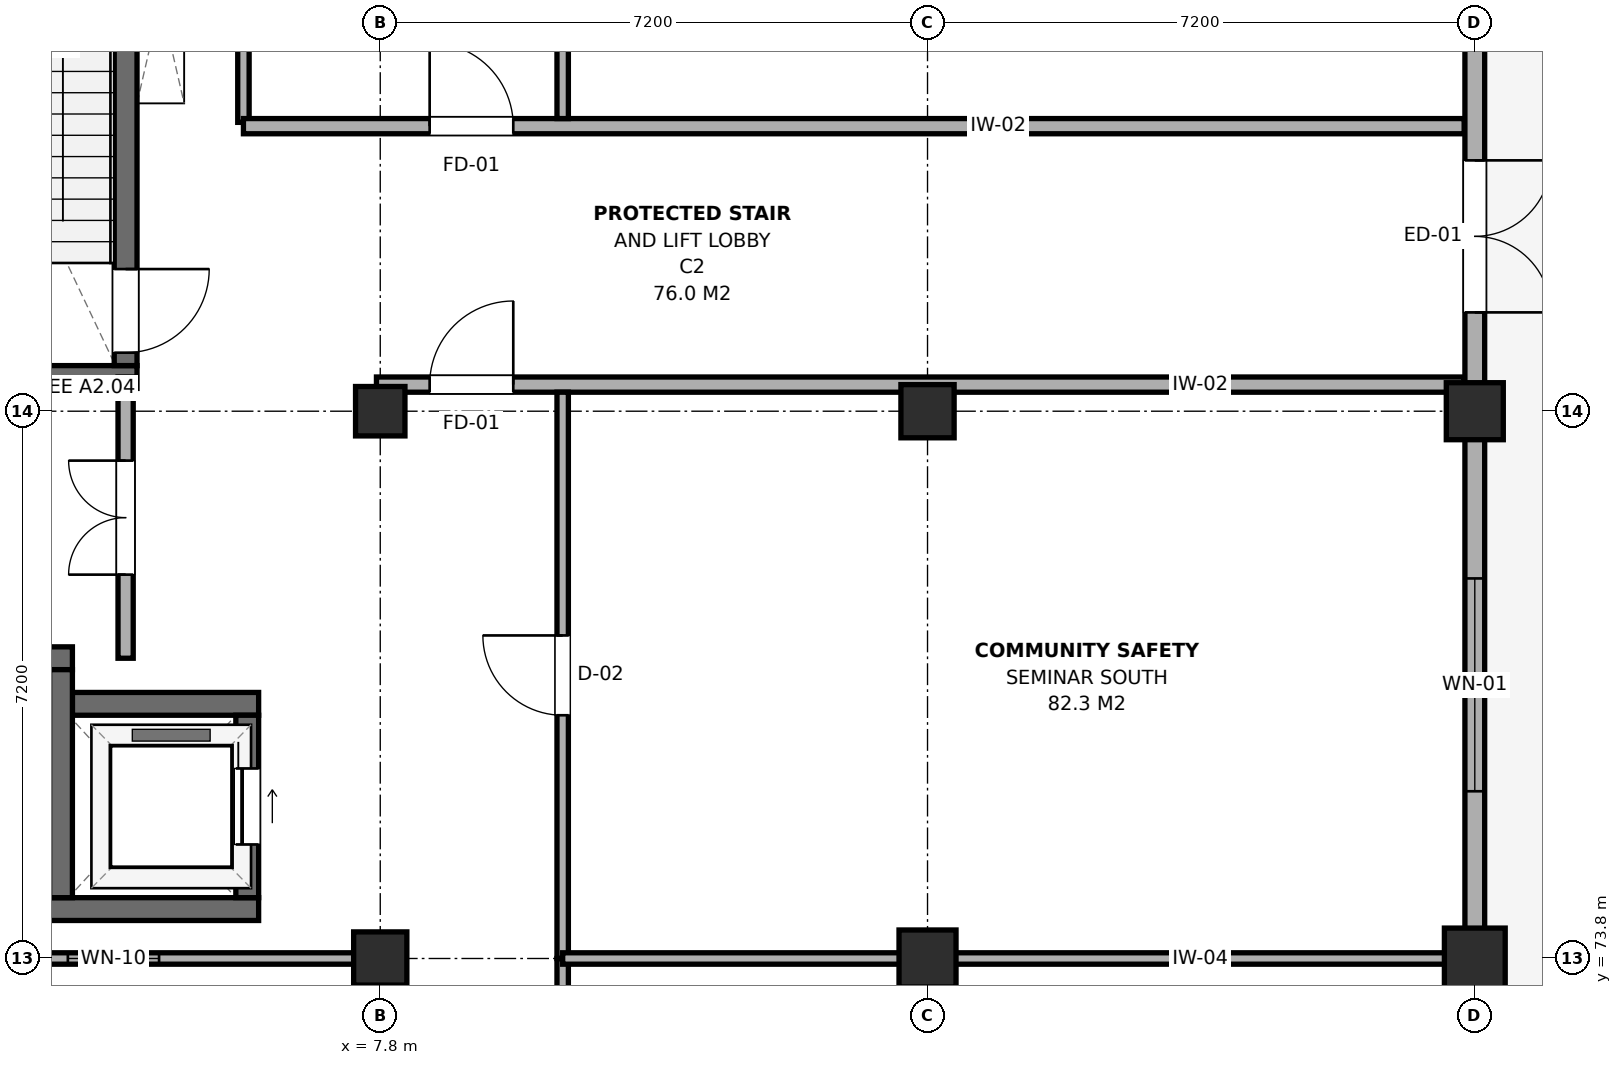
"""IFC4 building model, lengths in metres.
Left out: names, types, materials, properties, quantities, classifications, styles, units other than length and angle.
Written with IfcOpenShell. Run it as: python <this file> out.ifc"""

import sys

from ifc_helpers import new_model, si_unit, direction, frame, frame_2d, origin, origin_2d, place, context, subcontext, project, spatial, rectangle, extrude, element, fill, save


model = new_model("IFC4")
c1 = context("Model", 3, precision=1e-05, world=origin(), true_north=direction((0.0, 1.0)))
c2 = subcontext(c1, "Body", "Model", "MODEL_VIEW")
j1 = project(units=[si_unit("LENGTHUNIT", "METRE"), si_unit("PLANEANGLEUNIT", "RADIAN")], contexts=[c1])
p1 = place(None, origin())
s1 = spatial("IfcSite", under=j1, at=p1, CompositionType="ELEMENT")
p2 = place(p1, origin())
s2 = spatial("IfcBuilding", under=s1, at=p2, CompositionType="ELEMENT")
p3 = place(p2, origin())
s3 = spatial("IfcBuildingStorey", under=s2, at=p3, CompositionType="ELEMENT", Elevation=0.0)
p4 = place(p3, frame((7.8, 73.8, 0.0), z_axis=(0.0, 0.0, 1.0), x_axis=(1.0, 0.0, 0.0)))
e1 = element("IfcColumn", 1, at=p4, inside=s3, PredefinedType="COLUMN", context=c2, shape_type="SweptSolid", body=[
    extrude(rectangle(XDim=0.7, YDim=0.7, at=origin_2d()), origin(), (0.0, 0.0, 1.0), 4.8),
])
p5 = place(p3, frame((7.8, 81.0, 0.0), z_axis=(0.0, 0.0, 1.0), x_axis=(1.0, 0.0, 0.0)))
e2 = element("IfcColumn", 2, at=p5, inside=s3, PredefinedType="COLUMN", context=c2, shape_type="SweptSolid", body=[
    extrude(rectangle(XDim=0.65, YDim=0.65, at=origin_2d()), origin(), (0.0, 0.0, 1.0), 4.8),
])
p6 = place(p3, frame((15.0, 73.8, 0.0), z_axis=(0.0, 0.0, 1.0), x_axis=(1.0, 0.0, 0.0)))
e3 = element("IfcColumn", 3, at=p6, inside=s3, PredefinedType="COLUMN", context=c2, shape_type="SweptSolid", body=[
    extrude(rectangle(XDim=0.75, YDim=0.75, at=origin_2d()), origin(), (0.0, 0.0, 1.0), 4.8),
])
p7 = place(p3, frame((15.0, 81.0, 0.0), z_axis=(0.0, 0.0, 1.0), x_axis=(1.0, 0.0, 0.0)))
e4 = element("IfcColumn", 4, at=p7, inside=s3, PredefinedType="COLUMN", context=c2, shape_type="SweptSolid", body=[
    extrude(rectangle(XDim=0.7, YDim=0.7, at=origin_2d()), origin(), (0.0, 0.0, 1.0), 4.8),
])
p8 = place(p3, frame((22.2, 73.8, 0.0), z_axis=(0.0, 0.0, 1.0), x_axis=(1.0, 0.0, 0.0)))
e5 = element("IfcColumn", 5, at=p8, inside=s3, PredefinedType="COLUMN", context=c2, shape_type="SweptSolid", body=[
    extrude(rectangle(XDim=0.8, YDim=0.8, at=origin_2d()), origin(), (0.0, 0.0, 1.0), 4.8),
])
p9 = place(p3, frame((22.2, 81.0, 0.0), z_axis=(0.0, 0.0, 1.0), x_axis=(1.0, 0.0, 0.0)))
e6 = element("IfcColumn", 6, at=p9, inside=s3, PredefinedType="COLUMN", context=c2, shape_type="SweptSolid", body=[
    extrude(rectangle(XDim=0.75, YDim=0.75, at=origin_2d()), origin(), (0.0, 0.0, 1.0), 4.8),
])
p10 = place(p3, frame((0.75, 81.45, 0.0), z_axis=(0.0, 0.0, 1.0), x_axis=(1.0, 0.0, 0.0)))
e7 = element("IfcWall", 7, at=p10, inside=s3, PredefinedType="SHEAR", context=c2, shape_type="SweptSolid", body=[
    extrude(rectangle(XDim=3.85, YDim=0.3, at=frame_2d((1.925, 0.0))), origin(), (0.0, 0.0, 1.0), 4.56),
])
p11 = place(p3, frame((4.45, 81.6, 0.0), z_axis=(0.0, 0.0, 1.0), x_axis=(0.0, 1.0, 0.0)))
e8 = element("IfcWall", 8, at=p11, inside=s3, PredefinedType="SHEAR", context=c2, shape_type="SweptSolid", body=[
    extrude(rectangle(XDim=6.4, YDim=0.3, at=frame_2d((3.2, 0.0))), origin(), (0.0, 0.0, 1.0), 4.56),
])
p12 = place(p11, frame((0.17, 0.0, 0.0)))
e9 = element("IfcOpeningElement", 9, at=p12, cuts=e8, PredefinedType="OPENING", context=c2, shape_type="SweptSolid", body=[
    extrude(rectangle(XDim=1.1, YDim=2.15, at=frame_2d((0.55, 1.075))), frame((0.0, 0.165, 0.0), z_axis=(0.0, -1.0, 0.0), x_axis=(1.0, 0.0, 0.0)), (0.0, 0.0, 1.0), 0.33),
])
p13 = place(p3, frame((0.75, 74.45, 0.0), z_axis=(0.0, 0.0, 1.0), x_axis=(1.0, 0.0, 0.0)))
e10 = element("IfcWall", 10, at=p13, inside=s3, PredefinedType="SHEAR", context=c2, shape_type="SweptSolid", body=[
    extrude(rectangle(XDim=5.45, YDim=0.3, at=frame_2d((2.725, 0.0))), origin(), (0.0, 0.0, 1.0), 4.56),
])
p14 = place(p3, frame((0.75, 77.75, 0.0), z_axis=(0.0, 0.0, 1.0), x_axis=(1.0, 0.0, 0.0)))
e11 = element("IfcWall", 11, at=p14, inside=s3, PredefinedType="SHEAR", context=c2, shape_type="SweptSolid", body=[
    extrude(rectangle(XDim=3.0, YDim=0.3, at=frame_2d((1.5, 0.0))), origin(), (0.0, 0.0, 1.0), 4.56),
])
p15 = place(p14, frame((1.1, 0.0, 0.0)))
e12 = element("IfcOpeningElement", 12, at=p15, cuts=e11, PredefinedType="OPENING", context=c2, shape_type="SweptSolid", body=[
    extrude(rectangle(XDim=1.1, YDim=2.15, at=frame_2d((0.55, 1.075))), frame((0.0, 0.165, 0.0), z_axis=(0.0, -1.0, 0.0), x_axis=(1.0, 0.0, 0.0)), (0.0, 0.0, 1.0), 0.33),
])
p16 = place(p3, frame((3.75, 77.15, 0.0), z_axis=(0.0, 0.0, 1.0), x_axis=(1.0, 0.0, 0.0)))
e13 = element("IfcWall", 13, at=p16, inside=s3, PredefinedType="SHEAR", context=c2, shape_type="SweptSolid", body=[
    extrude(rectangle(XDim=2.45, YDim=0.3, at=frame_2d((1.225, 0.0))), origin(), (0.0, 0.0, 1.0), 4.56),
])
p17 = place(p3, frame((3.6, 74.6, 0.0), z_axis=(0.0, 0.0, 1.0), x_axis=(0.0, 1.0, 0.0)))
e14 = element("IfcWall", 14, at=p17, inside=s3, PredefinedType="SHEAR", context=c2, shape_type="SweptSolid", body=[
    extrude(rectangle(XDim=3.0, YDim=0.3, at=frame_2d((1.5, 0.0))), origin(), (0.0, 0.0, 1.0), 4.56),
])
p18 = place(p3, frame((6.05, 74.6, 0.0), z_axis=(0.0, 0.0, 1.0), x_axis=(0.0, 1.0, 0.0)))
e15 = element("IfcWall", 15, at=p18, inside=s3, PredefinedType="SHEAR", context=c2, shape_type="SweptSolid", body=[
    extrude(rectangle(XDim=2.4, YDim=0.3, at=frame_2d((1.2, 0.0))), origin(), (0.0, 0.0, 1.0), 4.56),
])
p19 = place(p18, frame((0.7, 0.0, 0.0)))
e16 = element("IfcOpeningElement", 16, at=p19, cuts=e15, PredefinedType="OPENING", context=c2, shape_type="SweptSolid", body=[
    extrude(rectangle(XDim=1.0, YDim=2.15, at=frame_2d((0.5, 1.075))), frame((0.0, 0.165, 0.0), z_axis=(0.0, -1.0, 0.0), x_axis=(1.0, 0.0, 0.0)), (0.0, 0.0, 1.0), 0.33),
])
p20 = place(p3, frame((22.2, 66.6, 0.0), z_axis=(0.0, 0.0, 1.0), x_axis=(0.0, 1.0, 0.0)))
e17 = element("IfcWall", 17, at=p20, inside=s3, PredefinedType="SOLIDWALL", context=c2, shape_type="SweptSolid", body=[
    extrude(rectangle(XDim=7.2, YDim=0.26, at=frame_2d((3.6, 0.0))), origin(), (0.0, 0.0, 1.0), 4.055),
])
p21 = place(p20, frame((2.2, 0.0, 0.9)))
e18 = element("IfcOpeningElement", 18, at=p21, cuts=e17, PredefinedType="OPENING", context=c2, shape_type="SweptSolid", body=[
    extrude(rectangle(XDim=2.8, YDim=2.2, at=frame_2d((1.4, 1.1))), frame((0.0, 0.145, 0.0), z_axis=(0.0, -1.0, 0.0), x_axis=(1.0, 0.0, 0.0)), (0.0, 0.0, 1.0), 0.29),
])
p22 = place(p3, frame((22.2, 73.8, 0.0), z_axis=(0.0, 0.0, 1.0), x_axis=(0.0, 1.0, 0.0)))
e19 = element("IfcWall", 19, at=p22, inside=s3, PredefinedType="SOLIDWALL", context=c2, shape_type="SweptSolid", body=[
    extrude(rectangle(XDim=7.2, YDim=0.26, at=frame_2d((3.6, 0.0))), origin(), (0.0, 0.0, 1.0), 4.105),
])
p23 = place(p22, frame((2.2, 0.0, 0.9)))
e20 = element("IfcOpeningElement", 20, at=p23, cuts=e19, PredefinedType="OPENING", context=c2, shape_type="SweptSolid", body=[
    extrude(rectangle(XDim=2.8, YDim=2.2, at=frame_2d((1.4, 1.1))), frame((0.0, 0.145, 0.0), z_axis=(0.0, -1.0, 0.0), x_axis=(1.0, 0.0, 0.0)), (0.0, 0.0, 1.0), 0.29),
])
p24 = place(p3, frame((22.2, 81.0, 0.0), z_axis=(0.0, 0.0, 1.0), x_axis=(0.0, 1.0, 0.0)))
e21 = element("IfcWall", 21, at=p24, inside=s3, PredefinedType="SOLIDWALL", context=c2, shape_type="SweptSolid", body=[
    extrude(rectangle(XDim=7.2, YDim=0.26, at=frame_2d((3.6, 0.0))), origin(), (0.0, 0.0, 1.0), 4.205),
])
p25 = place(p24, frame((1.3, 0.0, 0.0)))
e22 = element("IfcOpeningElement", 22, at=p25, cuts=e21, PredefinedType="OPENING", context=c2, shape_type="SweptSolid", body=[
    extrude(rectangle(XDim=2.0, YDim=2.25, at=frame_2d((1.0, 1.125))), frame((0.0, 0.145, 0.0), z_axis=(0.0, -1.0, 0.0), x_axis=(1.0, 0.0, 0.0)), (0.0, 0.0, 1.0), 0.29),
])
p26 = place(p3, frame((4.45, 77.75, 0.0), z_axis=(0.0, 0.0, 1.0), x_axis=(0.0, 1.0, 0.0)))
e23 = element("IfcWall", 23, at=p26, inside=s3, PredefinedType="PARTITIONING", context=c2, shape_type="SweptSolid", body=[
    extrude(rectangle(XDim=3.7, YDim=0.2, at=frame_2d((1.85, 0.0))), origin(), (0.0, 0.0, 1.0), 3.955),
])
p27 = place(p26, frame((1.1, 0.0, 0.0)))
e24 = element("IfcOpeningElement", 24, at=p27, cuts=e23, PredefinedType="OPENING", context=c2, shape_type="SweptSolid", body=[
    extrude(rectangle(XDim=1.5, YDim=2.15, at=frame_2d((0.75, 1.075))), frame((0.0, 0.115, 0.0), z_axis=(0.0, -1.0, 0.0), x_axis=(1.0, 0.0, 0.0)), (0.0, 0.0, 1.0), 0.23),
])
p28 = place(p3, frame((6.0, 84.8, 0.0), z_axis=(0.0, 0.0, 1.0), x_axis=(0.0, 1.0, 0.0)))
e25 = element("IfcWall", 25, at=p28, inside=s3, PredefinedType="PARTITIONING", context=c2, shape_type="SweptSolid", body=[
    extrude(rectangle(XDim=3.2, YDim=0.15, at=frame_2d((1.6, 0.0))), origin(), (0.0, 0.0, 1.0), 4.105),
])
p29 = place(p28, frame((1.175, 0.0, 0.0)))
e26 = element("IfcOpeningElement", 26, at=p29, cuts=e25, PredefinedType="OPENING", context=c2, shape_type="SweptSolid", body=[
    extrude(rectangle(XDim=0.85, YDim=2.1, at=frame_2d((0.425, 1.05))), frame((0.0, 0.09, 0.0), z_axis=(0.0, -1.0, 0.0), x_axis=(1.0, 0.0, 0.0)), (0.0, 0.0, 1.0), 0.18),
])
p30 = place(p3, frame((7.75, 81.35, 0.0), z_axis=(0.0, 0.0, 1.0), x_axis=(1.0, 0.0, 0.0)))
e27 = element("IfcWall", 27, at=p30, inside=s3, PredefinedType="PARTITIONING", context=c2, shape_type="SweptSolid", body=[
    extrude(rectangle(XDim=14.31, YDim=0.2, at=frame_2d((7.155, 0.0))), origin(), (0.0, 0.0, 1.0), 4.205),
])
p31 = place(p30, frame((0.7, 0.0, 0.0)))
e28 = element("IfcOpeningElement", 28, at=p31, cuts=e27, PredefinedType="OPENING", context=c2, shape_type="SweptSolid", body=[
    extrude(rectangle(XDim=1.1, YDim=2.15, at=frame_2d((0.55, 1.075))), frame((0.0, 0.115, 0.0), z_axis=(0.0, -1.0, 0.0), x_axis=(1.0, 0.0, 0.0)), (0.0, 0.0, 1.0), 0.23),
])
p32 = place(p3, frame((6.0, 84.75, 0.0), z_axis=(0.0, 0.0, 1.0), x_axis=(1.0, 0.0, 0.0)))
e29 = element("IfcWall", 29, at=p32, inside=s3, PredefinedType="PARTITIONING", context=c2, shape_type="SweptSolid", body=[
    extrude(rectangle(XDim=16.06, YDim=0.2, at=frame_2d((8.03, 0.0))), origin(), (0.0, 0.0, 1.0), 4.205),
])
p33 = place(p32, frame((2.45, 0.0, 0.0)))
e30 = element("IfcOpeningElement", 30, at=p33, cuts=e29, PredefinedType="OPENING", context=c2, shape_type="SweptSolid", body=[
    extrude(rectangle(XDim=1.1, YDim=2.15, at=frame_2d((0.55, 1.075))), frame((0.0, 0.115, 0.0), z_axis=(0.0, -1.0, 0.0), x_axis=(1.0, 0.0, 0.0)), (0.0, 0.0, 1.0), 0.23),
])
p34 = place(p3, frame((7.8, 58.8, 0.0), z_axis=(0.0, 0.0, 1.0), x_axis=(0.0, 1.0, 0.0)))
e31 = element("IfcWall", 31, at=p34, inside=s3, PredefinedType="PARTITIONING", context=c2, shape_type="SweptSolid", body=[
    extrude(rectangle(XDim=15.0, YDim=0.15, at=frame_2d((7.5, 0.0))), origin(), (0.0, 0.0, 1.0), 4.005),
])
p35 = place(p34, frame((6.075, 0.0, 0.0)))
e32 = element("IfcOpeningElement", 32, at=p35, cuts=e31, PredefinedType="OPENING", context=c2, shape_type="SweptSolid", body=[
    extrude(rectangle(XDim=1.05, YDim=2.15, at=frame_2d((0.525, 1.075))), frame((0.0, 0.09, 0.0), z_axis=(0.0, -1.0, 0.0), x_axis=(1.0, 0.0, 0.0)), (0.0, 0.0, 1.0), 0.18),
])
p36 = place(p34, frame((9.5, 0.0, 0.95)))
e33 = element("IfcOpeningElement", 33, at=p36, cuts=e31, PredefinedType="OPENING", context=c2, shape_type="SweptSolid", body=[
    extrude(rectangle(XDim=2.6, YDim=1.5, at=frame_2d((1.3, 0.75))), frame((0.0, 0.09, 0.0), z_axis=(0.0, -1.0, 0.0), x_axis=(1.0, 0.0, 0.0)), (0.0, 0.0, 1.0), 0.18),
])
p37 = place(p3, frame((0.78, 73.8, 0.0), z_axis=(0.0, 0.0, 1.0), x_axis=(1.0, 0.0, 0.0)))
e34 = element("IfcWall", 34, at=p37, inside=s3, PredefinedType="PARTITIONING", context=c2, shape_type="SweptSolid", body=[
    extrude(rectangle(XDim=7.02, YDim=0.15, at=frame_2d((3.51, 0.0))), origin(), (0.0, 0.0, 1.0), 4.105),
])
p38 = place(p37, frame((2.91, 0.0, 0.95)))
e35 = element("IfcOpeningElement", 35, at=p38, cuts=e34, PredefinedType="OPENING", context=c2, shape_type="SweptSolid", body=[
    extrude(rectangle(XDim=1.2, YDim=1.5, at=frame_2d((0.6, 0.75))), frame((0.0, 0.09, 0.0), z_axis=(0.0, -1.0, 0.0), x_axis=(1.0, 0.0, 0.0)), (0.0, 0.0, 1.0), 0.18),
])
p39 = place(p3, frame((10.2, 58.8, 0.0), z_axis=(0.0, 0.0, 1.0), x_axis=(0.0, 1.0, 0.0)))
e36 = element("IfcWall", 36, at=p39, inside=s3, PredefinedType="PARTITIONING", context=c2, shape_type="SweptSolid", body=[
    extrude(rectangle(XDim=15.0, YDim=0.15, at=frame_2d((7.5, 0.0))), origin(), (0.0, 0.0, 1.0), 4.005),
])
p40 = place(p39, frame((6.975, 0.0, 0.0)))
e37 = element("IfcOpeningElement", 37, at=p40, cuts=e36, PredefinedType="OPENING", context=c2, shape_type="SweptSolid", body=[
    extrude(rectangle(XDim=1.05, YDim=2.15, at=frame_2d((0.525, 1.075))), frame((0.0, 0.09, 0.0), z_axis=(0.0, -1.0, 0.0), x_axis=(1.0, 0.0, 0.0)), (0.0, 0.0, 1.0), 0.18),
])
p41 = place(p39, frame((9.5, 0.0, 0.95)))
e38 = element("IfcOpeningElement", 38, at=p41, cuts=e36, PredefinedType="OPENING", context=c2, shape_type="SweptSolid", body=[
    extrude(rectangle(XDim=2.6, YDim=1.5, at=frame_2d((1.3, 0.75))), frame((0.0, 0.09, 0.0), z_axis=(0.0, -1.0, 0.0), x_axis=(1.0, 0.0, 0.0)), (0.0, 0.0, 1.0), 0.18),
])
p42 = place(p3, frame((10.2, 73.8, 0.0), z_axis=(0.0, 0.0, 1.0), x_axis=(0.0, 1.0, 0.0)))
e39 = element("IfcWall", 39, at=p42, inside=s3, PredefinedType="PARTITIONING", context=c2, shape_type="SweptSolid", body=[
    extrude(rectangle(XDim=7.45, YDim=0.15, at=frame_2d((3.725, 0.0))), origin(), (0.0, 0.0, 1.0), 4.005),
])
p43 = place(p42, frame((3.2, 0.0, 0.0)))
e40 = element("IfcOpeningElement", 40, at=p43, cuts=e39, PredefinedType="OPENING", context=c2, shape_type="SweptSolid", body=[
    extrude(rectangle(XDim=1.05, YDim=2.15, at=frame_2d((0.525, 1.075))), frame((0.0, 0.09, 0.0), z_axis=(0.0, -1.0, 0.0), x_axis=(1.0, 0.0, 0.0)), (0.0, 0.0, 1.0), 0.18),
])
p44 = place(p3, frame((10.2, 73.8, 0.0), z_axis=(0.0, 0.0, 1.0), x_axis=(1.0, 0.0, 0.0)))
e41 = element("IfcWall", 41, at=p44, inside=s3, PredefinedType="PARTITIONING", context=c2, shape_type="SweptSolid", body=[
    extrude(rectangle(XDim=11.86, YDim=0.15, at=frame_2d((5.93, 0.0))), origin(), (0.0, 0.0, 1.0), 4.205),
])
p45 = place(p3, frame((10.2, 84.85, 0.0), z_axis=(0.0, 0.0, 1.0), x_axis=(0.0, 1.0, 0.0)))
e42 = element("IfcWall", 42, at=p45, inside=s3, PredefinedType="PARTITIONING", context=c2, shape_type="SweptSolid", body=[
    extrude(rectangle(XDim=11.15, YDim=0.15, at=frame_2d((5.575, 0.0))), origin(), (0.0, 0.0, 1.0), 4.005),
])
p46 = place(p45, frame((4.775, 0.0, 0.0)))
e43 = element("IfcOpeningElement", 43, at=p46, cuts=e42, PredefinedType="OPENING", context=c2, shape_type="SweptSolid", body=[
    extrude(rectangle(XDim=1.6, YDim=2.15, at=frame_2d((0.8, 1.075))), frame((0.0, 0.09, 0.0), z_axis=(0.0, -1.0, 0.0), x_axis=(1.0, 0.0, 0.0)), (0.0, 0.0, 1.0), 0.18),
])
p47 = place(p23, origin())
e44 = element("IfcWindow", 44, at=p47, inside=s3, PartitioningType="SINGLE_PANEL", PredefinedType="WINDOW", context=c2, shape_type="SweptSolid", body=[
    extrude(rectangle(XDim=2.8, YDim=2.2, at=frame_2d((1.4, 1.1))), frame((0.0, 0.03, 0.0), z_axis=(0.0, -1.0, 0.0), x_axis=(1.0, 0.0, 0.0)), (0.0, 0.0, 1.0), 0.06),
])
fill(e20, e44)
p48 = place(p25, frame((2.0, 0.0, 0.0), z_axis=(0.0, 0.0, 1.0), x_axis=(-1.0, 0.0, 0.0)))
e45 = element("IfcDoor", 45, at=p48, inside=s3, OperationType="DOUBLE_DOOR_SINGLE_SWING", PredefinedType="DOOR", context=c2, shape_type="SweptSolid", body=[
    extrude(rectangle(XDim=2.0, YDim=2.25, at=frame_2d((1.0, 1.125))), frame((0.0, 0.025, 0.0), z_axis=(0.0, -1.0, 0.0), x_axis=(1.0, 0.0, 0.0)), (0.0, 0.0, 1.0), 0.05),
])
fill(e22, e45)
p49 = place(p12, frame((1.1, 0.0, 0.0), z_axis=(0.0, 0.0, 1.0), x_axis=(-1.0, 0.0, 0.0)))
e46 = element("IfcDoor", 46, at=p49, inside=s3, OperationType="SINGLE_SWING_LEFT", PredefinedType="DOOR", context=c2, shape_type="SweptSolid", body=[
    extrude(rectangle(XDim=1.1, YDim=2.15, at=frame_2d((0.55, 1.075))), frame((0.0, 0.025, 0.0), z_axis=(0.0, -1.0, 0.0), x_axis=(1.0, 0.0, 0.0)), (0.0, 0.0, 1.0), 0.05),
])
fill(e9, e46)
p50 = place(p19, frame((1.0, 0.0, 0.0), z_axis=(0.0, 0.0, 1.0), x_axis=(-1.0, 0.0, 0.0)))
e47 = element("IfcDoor", 47, at=p50, inside=s3, OperationType="SLIDING_TO_RIGHT", PredefinedType="DOOR", context=c2, shape_type="SweptSolid", body=[
    extrude(rectangle(XDim=1.0, YDim=2.15, at=frame_2d((0.5, 1.075))), frame((0.0, 0.025, 0.0), z_axis=(0.0, -1.0, 0.0), x_axis=(1.0, 0.0, 0.0)), (0.0, 0.0, 1.0), 0.05),
])
fill(e16, e47)
p51 = place(p27, origin())
e48 = element("IfcDoor", 48, at=p51, inside=s3, OperationType="DOUBLE_DOOR_SINGLE_SWING", PredefinedType="DOOR", context=c2, shape_type="SweptSolid", body=[
    extrude(rectangle(XDim=1.5, YDim=2.15, at=frame_2d((0.75, 1.075))), frame((0.0, 0.025, 0.0), z_axis=(0.0, -1.0, 0.0), x_axis=(1.0, 0.0, 0.0)), (0.0, 0.0, 1.0), 0.05),
])
fill(e24, e48)
p52 = place(p31, origin())
e49 = element("IfcDoor", 49, at=p52, inside=s3, OperationType="SINGLE_SWING_RIGHT", PredefinedType="DOOR", context=c2, shape_type="SweptSolid", body=[
    extrude(rectangle(XDim=1.1, YDim=2.15, at=frame_2d((0.55, 1.075))), frame((0.0, 0.025, 0.0), z_axis=(0.0, -1.0, 0.0), x_axis=(1.0, 0.0, 0.0)), (0.0, 0.0, 1.0), 0.05),
])
fill(e28, e49)
p53 = place(p33, origin())
e50 = element("IfcDoor", 50, at=p53, inside=s3, OperationType="SINGLE_SWING_LEFT", PredefinedType="DOOR", context=c2, shape_type="SweptSolid", body=[
    extrude(rectangle(XDim=1.1, YDim=2.15, at=frame_2d((0.55, 1.075))), frame((0.0, 0.025, 0.0), z_axis=(0.0, -1.0, 0.0), x_axis=(1.0, 0.0, 0.0)), (0.0, 0.0, 1.0), 0.05),
])
fill(e30, e50)
p54 = place(p38, origin())
e51 = element("IfcWindow", 51, at=p54, inside=s3, PartitioningType="SINGLE_PANEL", PredefinedType="WINDOW", context=c2, shape_type="SweptSolid", body=[
    extrude(rectangle(XDim=1.2, YDim=1.5, at=frame_2d((0.6, 0.75))), frame((0.0, 0.03, 0.0), z_axis=(0.0, -1.0, 0.0), x_axis=(1.0, 0.0, 0.0)), (0.0, 0.0, 1.0), 0.06),
])
fill(e35, e51)
p55 = place(p43, origin())
e52 = element("IfcDoor", 52, at=p55, inside=s3, OperationType="SINGLE_SWING_RIGHT", PredefinedType="DOOR", context=c2, shape_type="SweptSolid", body=[
    extrude(rectangle(XDim=1.05, YDim=2.15, at=frame_2d((0.525, 1.075))), frame((0.0, 0.025, 0.0), z_axis=(0.0, -1.0, 0.0), x_axis=(1.0, 0.0, 0.0)), (0.0, 0.0, 1.0), 0.05),
])
fill(e40, e52)
save(model, sys.argv[1])
